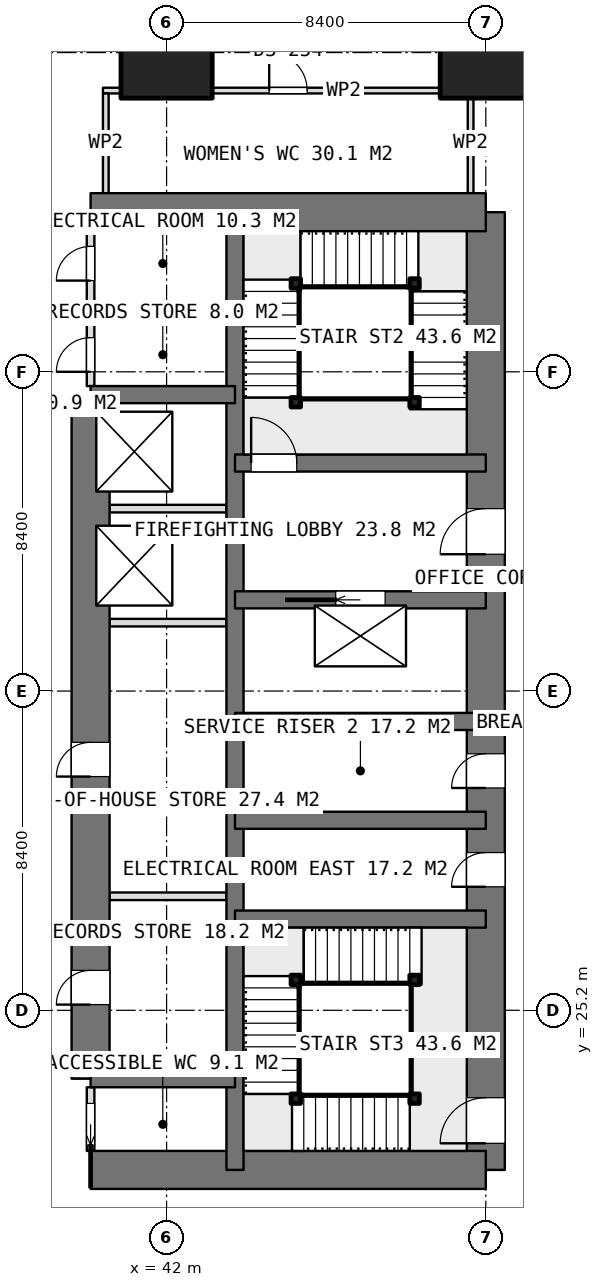
"""IFC4 building model, lengths in metres.
Left out: names, types, materials, properties, quantities, classifications, styles, units other than length and angle.
Written with IfcOpenShell. Run it as: python <this file> out.ifc"""

import sys

from ifc_helpers import new_model, si_unit, direction, frame, frame_2d, origin, origin_2d, place, context, subcontext, project, spatial, rectangle, extrude, element, fill, save


model = new_model("IFC4")
c1 = context("Model", 3, precision=1e-05, world=origin(), true_north=direction((0.0, 1.0)))
c2 = subcontext(c1, "Body", "Model", "MODEL_VIEW")
j1 = project(units=[si_unit("LENGTHUNIT", "METRE"), si_unit("PLANEANGLEUNIT", "RADIAN")], contexts=[c1])
p1 = place(None, origin())
s1 = spatial("IfcSite", under=j1, at=p1, CompositionType="ELEMENT")
p2 = place(p1, origin())
s2 = spatial("IfcBuilding", under=s1, at=p2, CompositionType="ELEMENT")
p3 = place(p2, frame((0.0, 0.0, 232.7)))
s3 = spatial("IfcBuildingStorey", under=s2, at=p3, CompositionType="ELEMENT", Elevation=232.7)
for number, where, z_axis, x_axis in (
    (1, (40.0, 21.0, 0.0), (0.0, 0.0, 1.0), (1.0, 0.0, 0.0)),
    (2, (40.0, 46.2, 0.0), (0.0, 0.0, 1.0), (1.0, 0.0, 0.0)),
):
    element("IfcWall", number, at=place(p3, frame(where, z_axis=z_axis, x_axis=x_axis)), inside=s3, PredefinedType="SHEAR", context=c2, shape_type="SweptSolid", body=[
        extrude(rectangle(XDim=10.4, YDim=1.0, at=frame_2d((5.2, 0.0))), origin(), (0.0, 0.0, 1.0), 3.75),
    ])
p4 = place(p3, frame((50.4, 21.0, 0.0), z_axis=(0.0, 0.0, 1.0), x_axis=(0.0, 1.0, 0.0)))
e3 = element("IfcWall", 3, at=p4, inside=s3, PredefinedType="SHEAR", context=c2, shape_type="SweptSolid", body=[
    extrude(rectangle(XDim=25.2, YDim=1.0, at=frame_2d((12.6, 0.0))), origin(), (0.0, 0.0, 1.0), 3.75),
])
p5 = place(p4, frame((16.2, 0.0, 0.0)))
e4 = element("IfcOpeningElement", 4, at=p5, cuts=e3, PredefinedType="OPENING", context=c2, shape_type="SweptSolid", body=[
    extrude(rectangle(XDim=1.2, YDim=2.1, at=frame_2d((0.6, 1.05))), frame((0.0, 0.51, 0.0), z_axis=(0.0, -1.0, 0.0), x_axis=(1.0, 0.0, 0.0)), (0.0, 0.0, 1.0), 1.02),
])
p6 = place(p4, frame((10.05, 0.0, 0.0)))
e5 = element("IfcOpeningElement", 5, at=p6, cuts=e3, PredefinedType="OPENING", context=c2, shape_type="SweptSolid", body=[
    extrude(rectangle(XDim=0.9, YDim=2.1, at=frame_2d((0.45, 1.05))), frame((0.0, 0.51, 0.0), z_axis=(0.0, -1.0, 0.0), x_axis=(1.0, 0.0, 0.0)), (0.0, 0.0, 1.0), 1.02),
])
p7 = place(p4, frame((7.45, 0.0, 0.0)))
e6 = element("IfcOpeningElement", 6, at=p7, cuts=e3, PredefinedType="OPENING", context=c2, shape_type="SweptSolid", body=[
    extrude(rectangle(XDim=0.9, YDim=2.1, at=frame_2d((0.45, 1.05))), frame((0.0, 0.51, 0.0), z_axis=(0.0, -1.0, 0.0), x_axis=(1.0, 0.0, 0.0)), (0.0, 0.0, 1.0), 1.02),
])
p8 = place(p4, frame((0.7, 0.0, 0.0)))
e7 = element("IfcOpeningElement", 7, at=p8, cuts=e3, PredefinedType="OPENING", context=c2, shape_type="SweptSolid", body=[
    extrude(rectangle(XDim=1.2, YDim=2.1, at=frame_2d((0.6, 1.05))), frame((0.0, 0.51, 0.0), z_axis=(0.0, -1.0, 0.0), x_axis=(1.0, 0.0, 0.0)), (0.0, 0.0, 1.0), 1.02),
])
p9 = place(p3, frame((43.8, 21.0, 0.0), z_axis=(0.0, 0.0, 1.0), x_axis=(0.0, 1.0, 0.0)))
e8 = element("IfcWall", 8, at=p9, inside=s3, PredefinedType="SHEAR", context=c2, shape_type="SweptSolid", body=[
    extrude(rectangle(XDim=25.2, YDim=0.45, at=frame_2d((12.6, 0.0))), origin(), (0.0, 0.0, 1.0), 3.75),
])
p10 = place(p3, frame((40.0, 23.4, 0.0), z_axis=(0.0, 0.0, 1.0), x_axis=(0.0, 1.0, 0.0)))
e9 = element("IfcWall", 9, at=p10, inside=s3, PredefinedType="SHEAR", context=c2, shape_type="SweptSolid", body=[
    extrude(rectangle(XDim=18.0, YDim=1.0, at=frame_2d((9.0, 0.0))), origin(), (0.0, 0.0, 1.0), 3.75),
])
p11 = place(p10, frame((1.95, 0.0, 0.0)))
e10 = element("IfcOpeningElement", 10, at=p11, cuts=e9, PredefinedType="OPENING", context=c2, shape_type="SweptSolid", body=[
    extrude(rectangle(XDim=0.9, YDim=2.1, at=frame_2d((0.45, 1.05))), frame((0.0, 0.51, 0.0), z_axis=(0.0, -1.0, 0.0), x_axis=(1.0, 0.0, 0.0)), (0.0, 0.0, 1.0), 1.02),
])
p12 = place(p10, frame((7.95, 0.0, 0.0)))
e11 = element("IfcOpeningElement", 11, at=p12, cuts=e9, PredefinedType="OPENING", context=c2, shape_type="SweptSolid", body=[
    extrude(rectangle(XDim=0.9, YDim=2.1, at=frame_2d((0.45, 1.05))), frame((0.0, 0.51, 0.0), z_axis=(0.0, -1.0, 0.0), x_axis=(1.0, 0.0, 0.0)), (0.0, 0.0, 1.0), 1.02),
])
for number, where, z_axis, x_axis in (
    (12, (40.0, 23.4, 0.0), (0.0, 0.0, 1.0), (1.0, 0.0, 0.0)),
    (13, (40.0, 41.4, 0.0), (0.0, 0.0, 1.0), (1.0, 0.0, 0.0)),
):
    element("IfcWall", number, at=place(p3, frame(where, z_axis=z_axis, x_axis=x_axis)), inside=s3, PredefinedType="SHEAR", context=c2, shape_type="SweptSolid", body=[
        extrude(rectangle(XDim=3.8, YDim=0.45, at=frame_2d((1.9, 0.0))), origin(), (0.0, 0.0, 1.0), 3.75),
    ])
for number, where, z_axis, x_axis in (
    (14, (43.8, 27.6, 0.0), (0.0, 0.0, 1.0), (1.0, 0.0, 0.0)),
    (15, (43.8, 30.2, 0.0), (0.0, 0.0, 1.0), (1.0, 0.0, 0.0)),
    (16, (43.8, 32.8, 0.0), (0.0, 0.0, 1.0), (1.0, 0.0, 0.0)),
):
    element("IfcWall", number, at=place(p3, frame(where, z_axis=z_axis, x_axis=x_axis)), inside=s3, PredefinedType="SHEAR", context=c2, shape_type="SweptSolid", body=[
        extrude(rectangle(XDim=6.6, YDim=0.45, at=frame_2d((3.3, 0.0))), origin(), (0.0, 0.0, 1.0), 3.75),
    ])
p13 = place(p3, frame((43.8, 36.0, 0.0), z_axis=(0.0, 0.0, 1.0), x_axis=(1.0, 0.0, 0.0)))
e17 = element("IfcWall", 17, at=p13, inside=s3, PredefinedType="SHEAR", context=c2, shape_type="SweptSolid", body=[
    extrude(rectangle(XDim=6.6, YDim=0.45, at=frame_2d((3.3, 0.0))), origin(), (0.0, 0.0, 1.0), 3.75),
])
p14 = place(p13, frame((2.65, 0.0, 0.0)))
e18 = element("IfcOpeningElement", 18, at=p14, cuts=e17, PredefinedType="OPENING", context=c2, shape_type="SweptSolid", body=[
    extrude(rectangle(XDim=1.3, YDim=2.1, at=frame_2d((0.65, 1.05))), frame((0.0, 0.235, 0.0), z_axis=(0.0, -1.0, 0.0), x_axis=(1.0, 0.0, 0.0)), (0.0, 0.0, 1.0), 0.47),
])
p15 = place(p3, frame((43.8, 39.6, 0.0), z_axis=(0.0, 0.0, 1.0), x_axis=(1.0, 0.0, 0.0)))
e19 = element("IfcWall", 19, at=p15, inside=s3, PredefinedType="SHEAR", context=c2, shape_type="SweptSolid", body=[
    extrude(rectangle(XDim=6.6, YDim=0.45, at=frame_2d((3.3, 0.0))), origin(), (0.0, 0.0, 1.0), 3.75),
])
p16 = place(p15, frame((0.425, 0.0, 0.0)))
e20 = element("IfcOpeningElement", 20, at=p16, cuts=e19, PredefinedType="OPENING", context=c2, shape_type="SweptSolid", body=[
    extrude(rectangle(XDim=1.2, YDim=2.1, at=frame_2d((0.6, 1.05))), frame((0.0, 0.235, 0.0), z_axis=(0.0, -1.0, 0.0), x_axis=(1.0, 0.0, 0.0)), (0.0, 0.0, 1.0), 0.47),
])
for number, where, z_axis, x_axis in (
    (21, (42.0, 50.4, 0.0), (0.0, 0.0, 1.0), (1.0, 0.0, 0.0)),
    (22, (50.4, 50.4, 0.0), (0.0, 0.0, 1.0), (1.0, 0.0, 0.0)),
):
    element("IfcColumn", number, at=place(p3, frame(where, z_axis=z_axis, x_axis=x_axis)), inside=s3, PredefinedType="COLUMN", context=c2, shape_type="SweptSolid", body=[
        extrude(rectangle(XDim=2.4, YDim=2.4, at=origin_2d()), origin(), (0.0, 0.0, 1.0), 3.75),
    ])
for number, where, z_axis, x_axis in (
    (23, (40.5, 35.4, 0.0), (0.0, 0.0, 1.0), (1.0, 0.0, 0.0)),
    (24, (40.5, 38.4, 0.0), (0.0, 0.0, 1.0), (1.0, 0.0, 0.0)),
):
    element("IfcWall", number, at=place(p3, frame(where, z_axis=z_axis, x_axis=x_axis)), inside=s3, PredefinedType="PARTITIONING", context=c2, shape_type="SweptSolid", body=[
        extrude(rectangle(XDim=3.075, YDim=0.2, at=frame_2d((1.538, 0.0))), origin(), (0.0, 0.0, 1.0), 3.5),
    ])
p17 = place(p3, frame((40.0, 21.5, 0.0), z_axis=(0.0, 0.0, 1.0), x_axis=(0.0, 1.0, 0.0)))
e25 = element("IfcWall", 25, at=p17, inside=s3, PredefinedType="PARTITIONING", context=c2, shape_type="SweptSolid", body=[
    extrude(rectangle(XDim=1.675, YDim=0.2, at=frame_2d((0.837, 0.0))), origin(), (0.0, 0.0, 1.0), 3.5),
])
p18 = place(p17, frame((0.15, 0.0, 0.0)))
e26 = element("IfcOpeningElement", 26, at=p18, cuts=e25, PredefinedType="OPENING", context=c2, shape_type="SweptSolid", body=[
    extrude(rectangle(XDim=1.1, YDim=2.1, at=frame_2d((0.55, 1.05))), frame((0.0, 0.11, 0.0), z_axis=(0.0, -1.0, 0.0), x_axis=(1.0, 0.0, 0.0)), (0.0, 0.0, 1.0), 0.22),
])
p19 = place(p3, frame((40.0, 41.625, 0.0), z_axis=(0.0, 0.0, 1.0), x_axis=(0.0, 1.0, 0.0)))
e27 = element("IfcWall", 27, at=p19, inside=s3, PredefinedType="PARTITIONING", context=c2, shape_type="SweptSolid", body=[
    extrude(rectangle(XDim=4.075, YDim=0.2, at=frame_2d((2.038, 0.0))), origin(), (0.0, 0.0, 1.0), 3.5),
])
p20 = place(p19, frame((2.775, 0.0, 0.0)))
e28 = element("IfcOpeningElement", 28, at=p20, cuts=e27, PredefinedType="OPENING", context=c2, shape_type="SweptSolid", body=[
    extrude(rectangle(XDim=0.9, YDim=2.1, at=frame_2d((0.45, 1.05))), frame((0.0, 0.11, 0.0), z_axis=(0.0, -1.0, 0.0), x_axis=(1.0, 0.0, 0.0)), (0.0, 0.0, 1.0), 0.22),
])
p21 = place(p19, frame((0.375, 0.0, 0.0)))
e29 = element("IfcOpeningElement", 29, at=p21, cuts=e27, PredefinedType="OPENING", context=c2, shape_type="SweptSolid", body=[
    extrude(rectangle(XDim=0.9, YDim=2.1, at=frame_2d((0.45, 1.05))), frame((0.0, 0.11, 0.0), z_axis=(0.0, -1.0, 0.0), x_axis=(1.0, 0.0, 0.0)), (0.0, 0.0, 1.0), 0.22),
])
p22 = place(p3, frame((40.5, 28.2, 0.0), z_axis=(0.0, 0.0, 1.0), x_axis=(1.0, 0.0, 0.0)))
e30 = element("IfcWall", 30, at=p22, inside=s3, PredefinedType="PARTITIONING", context=c2, shape_type="SweptSolid", body=[
    extrude(rectangle(XDim=3.075, YDim=0.2, at=frame_2d((1.538, 0.0))), origin(), (0.0, 0.0, 1.0), 3.5),
])
p23 = place(p3, frame((40.0, 43.5, 0.0), z_axis=(0.0, 0.0, 1.0), x_axis=(1.0, 0.0, 0.0)))
e31 = element("IfcWall", 31, at=p23, inside=s3, PredefinedType="PARTITIONING", context=c2, shape_type="SweptSolid", body=[
    extrude(rectangle(XDim=3.575, YDim=0.2, at=frame_2d((1.788, 0.0))), origin(), (0.0, 0.0, 1.0), 3.5),
])
p24 = place(p3, frame((40.325, 49.4, 0.0), z_axis=(0.0, 0.0, 1.0), x_axis=(1.0, 0.0, 0.0)))
e32 = element("IfcWall", 32, at=p24, inside=s3, PredefinedType="PARTITIONING", context=c2, shape_type="SweptSolid", body=[
    extrude(rectangle(XDim=9.75, YDim=0.15, at=frame_2d((4.875, 0.0))), origin(), (0.0, 0.0, 1.0), 3.5),
])
p25 = place(p24, frame((4.375, 0.0, 0.0)))
e33 = element("IfcOpeningElement", 33, at=p25, cuts=e32, PredefinedType="OPENING", context=c2, shape_type="SweptSolid", body=[
    extrude(rectangle(XDim=1.0, YDim=2.1, at=frame_2d((0.5, 1.05))), frame((0.0, 0.085, 0.0), z_axis=(0.0, -1.0, 0.0), x_axis=(1.0, 0.0, 0.0)), (0.0, 0.0, 1.0), 0.17),
])
for number, where, z_axis, x_axis in (
    (34, (40.4, 46.7, 0.0), (0.0, 0.0, 1.0), (0.0, 1.0, 0.0)),
    (35, (50.0, 46.7, 0.0), (0.0, 0.0, 1.0), (0.0, 1.0, 0.0)),
):
    element("IfcWall", number, at=place(p3, frame(where, z_axis=z_axis, x_axis=x_axis)), inside=s3, PredefinedType="PARTITIONING", context=c2, shape_type="SweptSolid", body=[
        extrude(rectangle(XDim=2.625, YDim=0.15, at=frame_2d((1.312, 0.0))), origin(), (0.0, 0.0, 1.0), 3.5),
    ])
for number, where, z_axis, x_axis in (
    (36, (45.4, 41.2, 0.0), (0.0, 0.0, 1.0), (1.0, 0.0, 0.0)),
    (37, (45.4, 44.325, 0.0), (0.0, 0.0, 1.0), (1.0, 0.0, 0.0)),
    (38, (48.525, 44.325, 0.0), (0.0, 0.0, 1.0), (1.0, 0.0, 0.0)),
    (39, (48.525, 41.2, 0.0), (0.0, 0.0, 1.0), (1.0, 0.0, 0.0)),
    (40, (48.525, 22.875, 0.0), (0.0, 0.0, 1.0), (1.0, 0.0, 0.0)),
    (41, (45.4, 22.875, 0.0), (0.0, 0.0, 1.0), (1.0, 0.0, 0.0)),
    (42, (45.4, 26.0, 0.0), (0.0, 0.0, 1.0), (1.0, 0.0, 0.0)),
    (43, (48.525, 26.0, 0.0), (0.0, 0.0, 1.0), (1.0, 0.0, 0.0)),
):
    element("IfcColumn", number, at=place(p3, frame(where, z_axis=z_axis, x_axis=x_axis)), inside=s3, PredefinedType="COLUMN", context=c2, shape_type="SweptSolid", body=[
        extrude(rectangle(XDim=0.25, YDim=0.25, at=origin_2d()), origin(), (0.0, 0.0, 1.0), 3.75),
    ])
p26 = place(p5, origin())
e44 = element("IfcDoor", 44, at=p26, inside=s3, OperationType="SINGLE_SWING_LEFT", PredefinedType="DOOR", context=c2, shape_type="SweptSolid", body=[
    extrude(rectangle(XDim=1.2, YDim=2.1, at=frame_2d((0.6, 1.05))), frame((0.0, 0.025, 0.0), z_axis=(0.0, -1.0, 0.0), x_axis=(1.0, 0.0, 0.0)), (0.0, 0.0, 1.0), 0.05),
])
fill(e4, e44)
p27 = place(p6, origin())
e45 = element("IfcDoor", 45, at=p27, inside=s3, OperationType="SINGLE_SWING_LEFT", PredefinedType="DOOR", context=c2, shape_type="SweptSolid", body=[
    extrude(rectangle(XDim=0.9, YDim=2.1, at=frame_2d((0.45, 1.05))), frame((0.0, 0.025, 0.0), z_axis=(0.0, -1.0, 0.0), x_axis=(1.0, 0.0, 0.0)), (0.0, 0.0, 1.0), 0.05),
])
fill(e5, e45)
p28 = place(p7, origin())
e46 = element("IfcDoor", 46, at=p28, inside=s3, OperationType="SINGLE_SWING_LEFT", PredefinedType="DOOR", context=c2, shape_type="SweptSolid", body=[
    extrude(rectangle(XDim=0.9, YDim=2.1, at=frame_2d((0.45, 1.05))), frame((0.0, 0.025, 0.0), z_axis=(0.0, -1.0, 0.0), x_axis=(1.0, 0.0, 0.0)), (0.0, 0.0, 1.0), 0.05),
])
fill(e6, e46)
p29 = place(p18, origin())
e47 = element("IfcDoor", 47, at=p29, inside=s3, OperationType="SLIDING_TO_LEFT", PredefinedType="DOOR", context=c2, shape_type="SweptSolid", body=[
    extrude(rectangle(XDim=1.1, YDim=2.1, at=frame_2d((0.55, 1.05))), frame((0.0, 0.025, 0.0), z_axis=(0.0, -1.0, 0.0), x_axis=(1.0, 0.0, 0.0)), (0.0, 0.0, 1.0), 0.05),
])
fill(e26, e47)
p30 = place(p20, origin())
e48 = element("IfcDoor", 48, at=p30, inside=s3, OperationType="SINGLE_SWING_LEFT", PredefinedType="DOOR", context=c2, shape_type="SweptSolid", body=[
    extrude(rectangle(XDim=0.9, YDim=2.1, at=frame_2d((0.45, 1.05))), frame((0.0, 0.025, 0.0), z_axis=(0.0, -1.0, 0.0), x_axis=(1.0, 0.0, 0.0)), (0.0, 0.0, 1.0), 0.05),
])
fill(e28, e48)
p31 = place(p21, origin())
e49 = element("IfcDoor", 49, at=p31, inside=s3, OperationType="SINGLE_SWING_LEFT", PredefinedType="DOOR", context=c2, shape_type="SweptSolid", body=[
    extrude(rectangle(XDim=0.9, YDim=2.1, at=frame_2d((0.45, 1.05))), frame((0.0, 0.025, 0.0), z_axis=(0.0, -1.0, 0.0), x_axis=(1.0, 0.0, 0.0)), (0.0, 0.0, 1.0), 0.05),
])
fill(e29, e49)
p32 = place(p11, origin())
e50 = element("IfcDoor", 50, at=p32, inside=s3, OperationType="SINGLE_SWING_LEFT", PredefinedType="DOOR", context=c2, shape_type="SweptSolid", body=[
    extrude(rectangle(XDim=0.9, YDim=2.1, at=frame_2d((0.45, 1.05))), frame((0.0, 0.025, 0.0), z_axis=(0.0, -1.0, 0.0), x_axis=(1.0, 0.0, 0.0)), (0.0, 0.0, 1.0), 0.05),
])
fill(e10, e50)
p33 = place(p12, origin())
e51 = element("IfcDoor", 51, at=p33, inside=s3, OperationType="SINGLE_SWING_LEFT", PredefinedType="DOOR", context=c2, shape_type="SweptSolid", body=[
    extrude(rectangle(XDim=0.9, YDim=2.1, at=frame_2d((0.45, 1.05))), frame((0.0, 0.025, 0.0), z_axis=(0.0, -1.0, 0.0), x_axis=(1.0, 0.0, 0.0)), (0.0, 0.0, 1.0), 0.05),
])
fill(e11, e51)
p34 = place(p14, origin())
e52 = element("IfcDoor", 52, at=p34, inside=s3, OperationType="SLIDING_TO_LEFT", PredefinedType="USERDEFINED", context=c2, shape_type="SweptSolid", body=[
    extrude(rectangle(XDim=1.3, YDim=2.1, at=frame_2d((0.65, 1.05))), frame((0.0, 0.025, 0.0), z_axis=(0.0, -1.0, 0.0), x_axis=(1.0, 0.0, 0.0)), (0.0, 0.0, 1.0), 0.05),
])
fill(e18, e52)
p35 = place(p25, origin())
e53 = element("IfcDoor", 53, at=p35, inside=s3, OperationType="SINGLE_SWING_LEFT", PredefinedType="DOOR", context=c2, shape_type="SweptSolid", body=[
    extrude(rectangle(XDim=1.0, YDim=2.1, at=frame_2d((0.5, 1.05))), frame((0.0, 0.025, 0.0), z_axis=(0.0, -1.0, 0.0), x_axis=(1.0, 0.0, 0.0)), (0.0, 0.0, 1.0), 0.05),
])
fill(e33, e53)
p36 = place(p16, origin())
e54 = element("IfcDoor", 54, at=p36, inside=s3, OperationType="SINGLE_SWING_RIGHT", PredefinedType="DOOR", context=c2, shape_type="SweptSolid", body=[
    extrude(rectangle(XDim=1.2, YDim=2.1, at=frame_2d((0.6, 1.05))), frame((0.0, 0.025, 0.0), z_axis=(0.0, -1.0, 0.0), x_axis=(1.0, 0.0, 0.0)), (0.0, 0.0, 1.0), 0.05),
])
fill(e20, e54)
p37 = place(p8, origin())
e55 = element("IfcDoor", 55, at=p37, inside=s3, OperationType="SINGLE_SWING_RIGHT", PredefinedType="DOOR", context=c2, shape_type="SweptSolid", body=[
    extrude(rectangle(XDim=1.2, YDim=2.1, at=frame_2d((0.6, 1.05))), frame((0.0, 0.025, 0.0), z_axis=(0.0, -1.0, 0.0), x_axis=(1.0, 0.0, 0.0)), (0.0, 0.0, 1.0), 0.05),
])
fill(e7, e55)
save(model, sys.argv[1])
